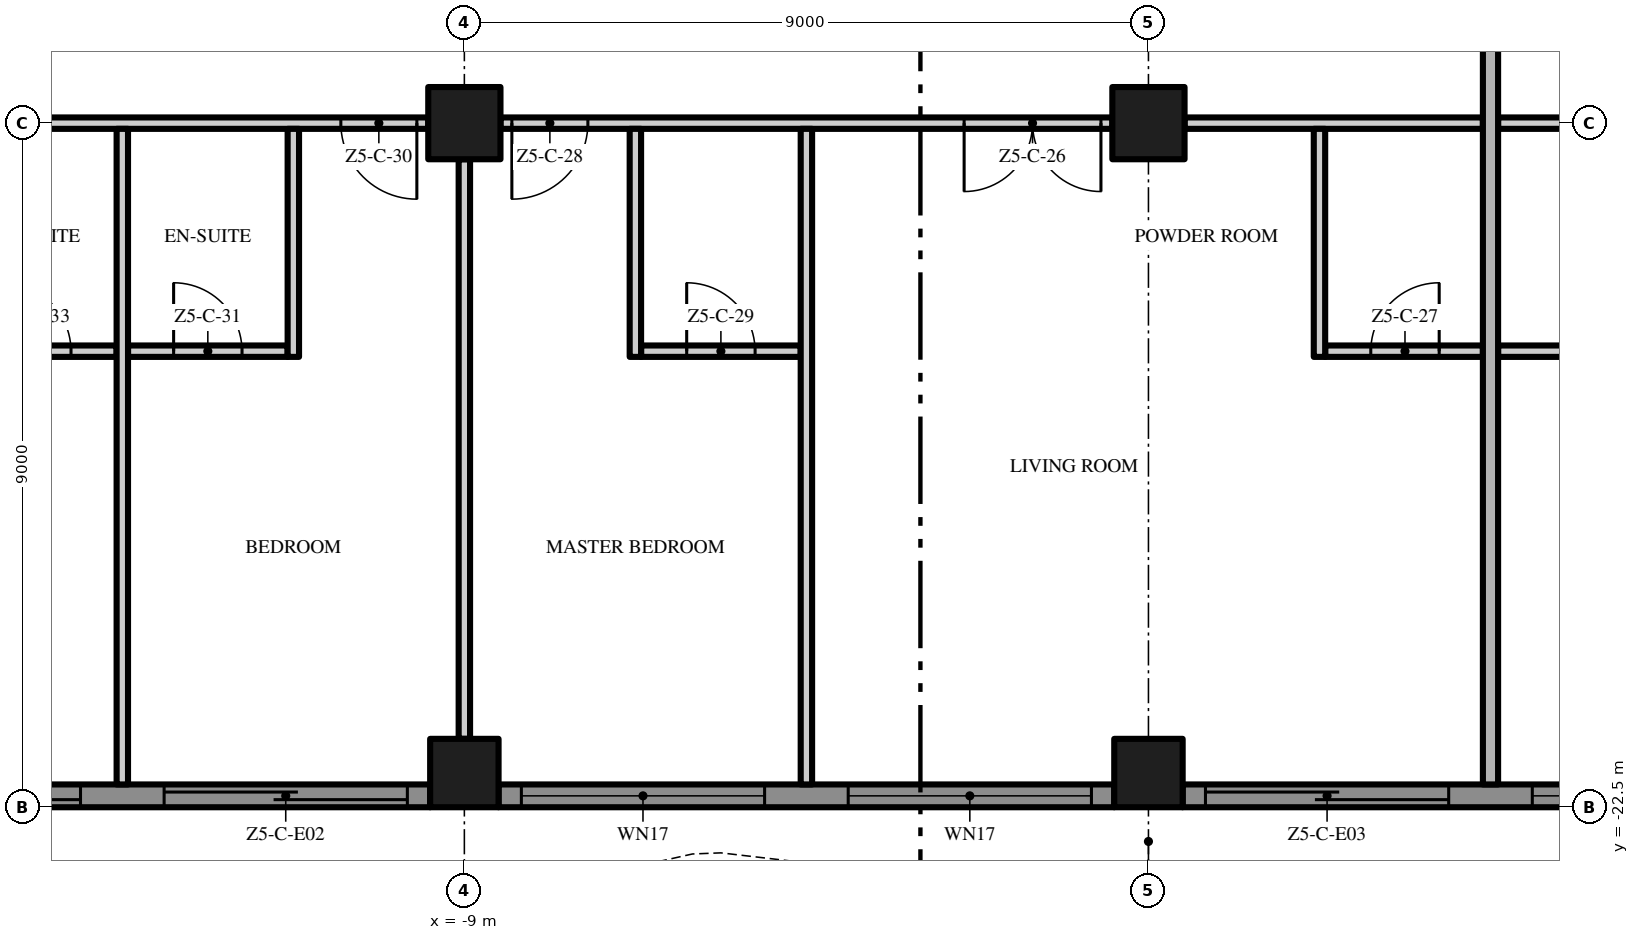
"""IFC4 building model, lengths in metres.
Left out: names, types, materials, properties, quantities, classifications, styles, units other than length and angle.
Written with IfcOpenShell. Run it as: python <this file> out.ifc"""

import sys

from ifc_helpers import new_model, si_unit, direction, frame, frame_2d, origin, origin_2d, place, context, subcontext, project, spatial, polyline, rectangle, outline, extrude, element, fill, save


model = new_model("IFC4")
c1 = context("Model", 3, precision=1e-05, world=origin(), true_north=direction((0.0, 1.0)))
c2 = subcontext(c1, "Body", "Model", "MODEL_VIEW")
j1 = project(units=[si_unit("LENGTHUNIT", "METRE"), si_unit("PLANEANGLEUNIT", "RADIAN")], contexts=[c1])
p1 = place(None, origin())
s1 = spatial("IfcSite", under=j1, at=p1, CompositionType="ELEMENT")
p2 = place(p1, origin())
s2 = spatial("IfcBuilding", under=s1, at=p2, CompositionType="ELEMENT")
p3 = place(p2, frame((0.0, 0.0, 261.6)))
s3 = spatial("IfcBuildingStorey", under=s2, at=p3, CompositionType="ELEMENT", Elevation=261.6)
p4 = place(p3, frame((-9.0, -13.5, 0.0), z_axis=(0.0, 0.0, 1.0), x_axis=(1.0, 0.0, 0.0)))
e1 = element("IfcColumn", 1, at=p4, inside=s3, PredefinedType="COLUMN", context=c2, shape_type="SweptSolid", body=[
    extrude(rectangle(XDim=0.95, YDim=0.95, at=origin_2d()), origin(), (0.0, 0.0, 1.0), 3.5),
])
p5 = place(p3, frame((-9.0, -22.05, 0.0), z_axis=(0.0, 0.0, 1.0), x_axis=(1.0, 0.0, 0.0)))
e2 = element("IfcColumn", 2, at=p5, inside=s3, PredefinedType="COLUMN", context=c2, shape_type="SweptSolid", body=[
    extrude(rectangle(XDim=0.9, YDim=0.9, at=origin_2d()), origin(), (0.0, 0.0, 1.0), 3.5),
])
p6 = place(p3, frame((0.0, -13.5, 0.0), z_axis=(0.0, 0.0, 1.0), x_axis=(1.0, 0.0, 0.0)))
e3 = element("IfcColumn", 3, at=p6, inside=s3, PredefinedType="COLUMN", context=c2, shape_type="SweptSolid", body=[
    extrude(rectangle(XDim=0.95, YDim=0.95, at=origin_2d()), origin(), (0.0, 0.0, 1.0), 3.5),
])
p7 = place(p3, frame((0.0, -22.05, 0.0), z_axis=(0.0, 0.0, 1.0), x_axis=(1.0, 0.0, 0.0)))
e4 = element("IfcColumn", 4, at=p7, inside=s3, PredefinedType="COLUMN", context=c2, shape_type="SweptSolid", body=[
    extrude(rectangle(XDim=0.9, YDim=0.9, at=origin_2d()), origin(), (0.0, 0.0, 1.0), 3.5),
])
p8 = place(p3, frame((-9.45, -22.35, 0.0), z_axis=(0.0, 0.0, 1.0), x_axis=(-1.0, 0.0, 0.0)))
e5 = element("IfcWall", 5, at=p8, inside=s3, PredefinedType="SOLIDWALL", context=c2, shape_type="SweptSolid", body=[
    extrude(rectangle(XDim=8.1, YDim=0.3, at=frame_2d((4.05, 0.0))), origin(), (0.0, 0.0, 1.0), 3.5),
])
p9 = place(p8, frame((4.6, 0.0, 0.0)))
e6 = element("IfcOpeningElement", 6, at=p9, cuts=e5, PredefinedType="OPENING", context=c2, shape_type="SweptSolid", body=[
    extrude(rectangle(XDim=3.2, YDim=2.4, at=frame_2d((1.6, 1.2))), frame((0.0, 0.16, 0.0), z_axis=(0.0, -1.0, 0.0), x_axis=(1.0, 0.0, 0.0)), (0.0, 0.0, 1.0), 0.32),
])
p10 = place(p8, frame((0.3, 0.0, 0.0)))
e7 = element("IfcOpeningElement", 7, at=p10, cuts=e5, PredefinedType="OPENING", context=c2, shape_type="SweptSolid", body=[
    extrude(rectangle(XDim=3.2, YDim=2.4, at=frame_2d((1.6, 1.2))), frame((0.0, 0.16, 0.0), z_axis=(0.0, -1.0, 0.0), x_axis=(1.0, 0.0, 0.0)), (0.0, 0.0, 1.0), 0.32),
])
p11 = place(p3, frame((-0.45, -22.35, 0.0), z_axis=(0.0, 0.0, 1.0), x_axis=(-1.0, 0.0, 0.0)))
e8 = element("IfcWall", 8, at=p11, inside=s3, PredefinedType="SOLIDWALL", context=c2, shape_type="SweptSolid", body=[
    extrude(rectangle(XDim=8.1, YDim=0.3, at=frame_2d((4.05, 0.0))), origin(), (0.0, 0.0, 1.0), 3.5),
])
p12 = place(p11, frame((4.6, 0.0, 0.45)))
e9 = element("IfcOpeningElement", 9, at=p12, cuts=e8, PredefinedType="OPENING", context=c2, shape_type="SweptSolid", body=[
    extrude(rectangle(XDim=3.2, YDim=2.65, at=frame_2d((1.6, 1.325))), frame((0.0, 0.16, 0.0), z_axis=(0.0, -1.0, 0.0), x_axis=(1.0, 0.0, 0.0)), (0.0, 0.0, 1.0), 0.32),
])
p13 = place(p11, frame((0.3, 0.0, 0.45)))
e10 = element("IfcOpeningElement", 10, at=p13, cuts=e8, PredefinedType="OPENING", context=c2, shape_type="SweptSolid", body=[
    extrude(rectangle(XDim=3.2, YDim=2.65, at=frame_2d((1.6, 1.325))), frame((0.0, 0.16, 0.0), z_axis=(0.0, -1.0, 0.0), x_axis=(1.0, 0.0, 0.0)), (0.0, 0.0, 1.0), 0.32),
])
p14 = place(p3, frame((8.55, -22.35, 0.0), z_axis=(0.0, 0.0, 1.0), x_axis=(-1.0, 0.0, 0.0)))
e11 = element("IfcWall", 11, at=p14, inside=s3, PredefinedType="SOLIDWALL", context=c2, shape_type="SweptSolid", body=[
    extrude(rectangle(XDim=8.1, YDim=0.3, at=frame_2d((4.05, 0.0))), origin(), (0.0, 0.0, 1.0), 3.5),
])
p15 = place(p14, frame((4.6, 0.0, 0.0)))
e12 = element("IfcOpeningElement", 12, at=p15, cuts=e11, PredefinedType="OPENING", context=c2, shape_type="SweptSolid", body=[
    extrude(rectangle(XDim=3.2, YDim=2.4, at=frame_2d((1.6, 1.2))), frame((0.0, 0.16, 0.0), z_axis=(0.0, -1.0, 0.0), x_axis=(1.0, 0.0, 0.0)), (0.0, 0.0, 1.0), 0.32),
])
p16 = place(p14, frame((0.3, 0.0, 0.45)))
e13 = element("IfcOpeningElement", 13, at=p16, cuts=e11, PredefinedType="OPENING", context=c2, shape_type="SweptSolid", body=[
    extrude(rectangle(XDim=3.2, YDim=2.65, at=frame_2d((1.6, 1.325))), frame((0.0, 0.16, 0.0), z_axis=(0.0, -1.0, 0.0), x_axis=(1.0, 0.0, 0.0)), (0.0, 0.0, 1.0), 0.32),
])
p17 = place(p3, origin())
e14 = element("IfcWall", 14, at=p17, inside=s3, PredefinedType="USERDEFINED", context=c2, shape_type="SweptSolid", body=[
    extrude(outline(polyline([(-22.5, -23.451), (-21.0, -23.115), (-20.625, -23.1), (-19.5, -23.231), (-18.0, -23.755), (-16.5, -24.488), (-15.0, -25.149), (-13.5, -25.485), (-13.125, -25.5), (-12.0, -25.369), (-10.5, -24.845), (-9.0, -24.112), (-7.5, -23.451), (-6.0, -23.115), (-5.625, -23.1), (-4.5, -23.231), (-3.0, -23.755), (-1.5, -24.488), (0.0, -25.149), (1.5, -25.485), (1.875, -25.5), (3.0, -25.369), (4.5, -24.845), (6.0, -24.112), (7.5, -23.451), (9.0, -23.115), (9.375, -23.1), (10.5, -23.231), (12.0, -23.755), (13.5, -24.488), (15.0, -25.149), (16.5, -25.485), (16.875, -25.5), (18.0, -25.369), (19.5, -24.845), (21.0, -24.112), (22.5, -23.451), (22.399, -23.223), (20.895, -23.885), (19.404, -24.614), (17.944, -25.124), (16.865, -25.249), (16.533, -25.236), (15.079, -24.91), (13.605, -24.261), (12.096, -23.524), (10.556, -22.986), (9.385, -22.849), (8.967, -22.866), (7.421, -23.213), (5.895, -23.885), (4.404, -24.614), (2.944, -25.124), (1.865, -25.249), (1.533, -25.236), (0.079, -24.91), (-1.395, -24.261), (-2.904, -23.524), (-4.444, -22.986), (-5.615, -22.849), (-6.033, -22.866), (-7.579, -23.213), (-9.105, -23.885), (-10.596, -24.614), (-12.056, -25.124), (-13.135, -25.249), (-13.467, -25.236), (-14.921, -24.91), (-16.395, -24.261), (-17.904, -23.524), (-19.444, -22.986), (-20.615, -22.849), (-21.033, -22.866), (-22.555, -23.208), (-22.5, -23.451)])), origin(), (0.0, 0.0, 1.0), 0.9),
])
p18 = place(p3, frame((-15.675, -16.5, 0.0), z_axis=(0.0, 0.0, 1.0), x_axis=(1.0, 0.0, 0.0)))
e15 = element("IfcWall", 15, at=p18, inside=s3, PredefinedType="PARTITIONING", context=c2, shape_type="SweptSolid", body=[
    extrude(rectangle(XDim=2.1, YDim=0.15, at=frame_2d((1.05, 0.0))), origin(), (0.0, 0.0, 1.0), 3.5),
])
p19 = place(p18, frame((0.6, 0.0, 0.0)))
e16 = element("IfcOpeningElement", 16, at=p19, cuts=e15, PredefinedType="OPENING", context=c2, shape_type="SweptSolid", body=[
    extrude(rectangle(XDim=0.9, YDim=2.1, at=frame_2d((0.45, 1.05))), frame((0.0, 0.085, 0.0), z_axis=(0.0, -1.0, 0.0), x_axis=(1.0, 0.0, 0.0)), (0.0, 0.0, 1.0), 0.17),
])
p20 = place(p3, frame((-13.425, -16.5, 0.0), z_axis=(0.0, 0.0, 1.0), x_axis=(1.0, 0.0, 0.0)))
e17 = element("IfcWall", 17, at=p20, inside=s3, PredefinedType="PARTITIONING", context=c2, shape_type="SweptSolid", body=[
    extrude(rectangle(XDim=2.1, YDim=0.15, at=frame_2d((1.05, 0.0))), origin(), (0.0, 0.0, 1.0), 3.5),
])
p21 = place(p20, frame((0.6, 0.0, 0.0)))
e18 = element("IfcOpeningElement", 18, at=p21, cuts=e17, PredefinedType="OPENING", context=c2, shape_type="SweptSolid", body=[
    extrude(rectangle(XDim=0.9, YDim=2.1, at=frame_2d((0.45, 1.05))), frame((0.0, 0.085, 0.0), z_axis=(0.0, -1.0, 0.0), x_axis=(1.0, 0.0, 0.0)), (0.0, 0.0, 1.0), 0.17),
])
p22 = place(p3, frame((-6.675, -16.5, 0.0), z_axis=(0.0, 0.0, 1.0), x_axis=(1.0, 0.0, 0.0)))
e19 = element("IfcWall", 19, at=p22, inside=s3, PredefinedType="PARTITIONING", context=c2, shape_type="SweptSolid", body=[
    extrude(rectangle(XDim=2.1, YDim=0.15, at=frame_2d((1.05, 0.0))), origin(), (0.0, 0.0, 1.0), 3.5),
])
p23 = place(p22, frame((0.6, 0.0, 0.0)))
e20 = element("IfcOpeningElement", 20, at=p23, cuts=e19, PredefinedType="OPENING", context=c2, shape_type="SweptSolid", body=[
    extrude(rectangle(XDim=0.9, YDim=2.1, at=frame_2d((0.45, 1.05))), frame((0.0, 0.085, 0.0), z_axis=(0.0, -1.0, 0.0), x_axis=(1.0, 0.0, 0.0)), (0.0, 0.0, 1.0), 0.17),
])
p24 = place(p3, frame((2.325, -16.5, 0.0), z_axis=(0.0, 0.0, 1.0), x_axis=(1.0, 0.0, 0.0)))
e21 = element("IfcWall", 21, at=p24, inside=s3, PredefinedType="PARTITIONING", context=c2, shape_type="SweptSolid", body=[
    extrude(rectangle(XDim=2.075, YDim=0.15, at=frame_2d((1.038, 0.0))), origin(), (0.0, 0.0, 1.0), 3.5),
])
p25 = place(p24, frame((0.6, 0.0, 0.0)))
e22 = element("IfcOpeningElement", 22, at=p25, cuts=e21, PredefinedType="OPENING", context=c2, shape_type="SweptSolid", body=[
    extrude(rectangle(XDim=0.9, YDim=2.1, at=frame_2d((0.45, 1.05))), frame((0.0, 0.085, 0.0), z_axis=(0.0, -1.0, 0.0), x_axis=(1.0, 0.0, 0.0)), (0.0, 0.0, 1.0), 0.17),
])
p26 = place(p3, frame((4.6, -16.5, 0.0), z_axis=(0.0, 0.0, 1.0), x_axis=(1.0, 0.0, 0.0)))
e23 = element("IfcWall", 23, at=p26, inside=s3, PredefinedType="PARTITIONING", context=c2, shape_type="SweptSolid", body=[
    extrude(rectangle(XDim=2.075, YDim=0.15, at=frame_2d((1.038, 0.0))), origin(), (0.0, 0.0, 1.0), 3.5),
])
p27 = place(p3, frame((-9.475, -13.5, 0.0), z_axis=(0.0, 0.0, 1.0), x_axis=(-1.0, 0.0, 0.0)))
e24 = element("IfcWall", 24, at=p27, inside=s3, PredefinedType="PARTITIONING", context=c2, shape_type="SweptSolid", body=[
    extrude(rectangle(XDim=8.05, YDim=0.15, at=frame_2d((4.025, 0.0))), origin(), (0.0, 0.0, 1.0), 3.5),
])
p28 = place(p27, frame((0.15, 0.0, 0.0)))
e25 = element("IfcOpeningElement", 25, at=p28, cuts=e24, PredefinedType="OPENING", context=c2, shape_type="SweptSolid", body=[
    extrude(rectangle(XDim=1.0, YDim=2.4, at=frame_2d((0.5, 1.2))), frame((0.0, 0.085, 0.0), z_axis=(0.0, -1.0, 0.0), x_axis=(1.0, 0.0, 0.0)), (0.0, 0.0, 1.0), 0.17),
])
p29 = place(p27, frame((6.9, 0.0, 0.0)))
e26 = element("IfcOpeningElement", 26, at=p29, cuts=e24, PredefinedType="OPENING", context=c2, shape_type="SweptSolid", body=[
    extrude(rectangle(XDim=1.0, YDim=2.4, at=frame_2d((0.5, 1.2))), frame((0.0, 0.085, 0.0), z_axis=(0.0, -1.0, 0.0), x_axis=(1.0, 0.0, 0.0)), (0.0, 0.0, 1.0), 0.17),
])
p30 = place(p3, frame((-0.475, -13.5, 0.0), z_axis=(0.0, 0.0, 1.0), x_axis=(-1.0, 0.0, 0.0)))
e27 = element("IfcWall", 27, at=p30, inside=s3, PredefinedType="PARTITIONING", context=c2, shape_type="SweptSolid", body=[
    extrude(rectangle(XDim=8.05, YDim=0.15, at=frame_2d((4.025, 0.0))), origin(), (0.0, 0.0, 1.0), 3.5),
])
p31 = place(p30, frame((0.15, 0.0, 0.0)))
e28 = element("IfcOpeningElement", 28, at=p31, cuts=e27, PredefinedType="OPENING", context=c2, shape_type="SweptSolid", body=[
    extrude(rectangle(XDim=1.8, YDim=2.4, at=frame_2d((0.9, 1.2))), frame((0.0, 0.085, 0.0), z_axis=(0.0, -1.0, 0.0), x_axis=(1.0, 0.0, 0.0)), (0.0, 0.0, 1.0), 0.17),
])
p32 = place(p30, frame((6.9, 0.0, 0.0)))
e29 = element("IfcOpeningElement", 29, at=p32, cuts=e27, PredefinedType="OPENING", context=c2, shape_type="SweptSolid", body=[
    extrude(rectangle(XDim=1.0, YDim=2.4, at=frame_2d((0.5, 1.2))), frame((0.0, 0.085, 0.0), z_axis=(0.0, -1.0, 0.0), x_axis=(1.0, 0.0, 0.0)), (0.0, 0.0, 1.0), 0.17),
])
for number, where, z_axis, x_axis in (
    (30, (0.475, -13.5, 0.0), (0.0, 0.0, 1.0), (1.0, 0.0, 0.0)),
    (31, (4.6, -13.5, 0.0), (0.0, 0.0, 1.0), (1.0, 0.0, 0.0)),
):
    element("IfcWall", number, at=place(p3, frame(where, z_axis=z_axis, x_axis=x_axis)), inside=s3, PredefinedType="PARTITIONING", context=c2, shape_type="SweptSolid", body=[
        extrude(rectangle(XDim=3.925, YDim=0.15, at=frame_2d((1.962, 0.0))), origin(), (0.0, 0.0, 1.0), 3.5),
    ])
p33 = place(p3, frame((-13.5, -22.2, 0.0), z_axis=(0.0, 0.0, 1.0), x_axis=(0.0, 1.0, 0.0)))
e32 = element("IfcWall", 32, at=p33, inside=s3, PredefinedType="PARTITIONING", context=c2, shape_type="SweptSolid", body=[
    extrude(rectangle(XDim=8.625, YDim=0.15, at=frame_2d((4.312, 0.0))), origin(), (0.0, 0.0, 1.0), 3.5),
])
p34 = place(p3, frame((-11.25, -16.575, 0.0), z_axis=(0.0, 0.0, 1.0), x_axis=(0.0, 1.0, 0.0)))
e33 = element("IfcWall", 33, at=p34, inside=s3, PredefinedType="PARTITIONING", context=c2, shape_type="SweptSolid", body=[
    extrude(rectangle(XDim=3.0, YDim=0.15, at=frame_2d((1.5, 0.0))), origin(), (0.0, 0.0, 1.0), 3.5),
])
p35 = place(p3, frame((-9.0, -21.6, 0.0), z_axis=(0.0, 0.0, 1.0), x_axis=(0.0, 1.0, 0.0)))
e34 = element("IfcWall", 34, at=p35, inside=s3, PredefinedType="PARTITIONING", context=c2, shape_type="SweptSolid", body=[
    extrude(rectangle(XDim=7.625, YDim=0.15, at=frame_2d((3.812, 0.0))), origin(), (0.0, 0.0, 1.0), 3.5),
])
p36 = place(p3, frame((-6.75, -16.575, 0.0), z_axis=(0.0, 0.0, 1.0), x_axis=(0.0, 1.0, 0.0)))
e35 = element("IfcWall", 35, at=p36, inside=s3, PredefinedType="PARTITIONING", context=c2, shape_type="SweptSolid", body=[
    extrude(rectangle(XDim=3.0, YDim=0.15, at=frame_2d((1.5, 0.0))), origin(), (0.0, 0.0, 1.0), 3.5),
])
p37 = place(p3, frame((-4.5, -22.2, 0.0), z_axis=(0.0, 0.0, 1.0), x_axis=(0.0, 1.0, 0.0)))
e36 = element("IfcWall", 36, at=p37, inside=s3, PredefinedType="PARTITIONING", context=c2, shape_type="SweptSolid", body=[
    extrude(rectangle(XDim=8.625, YDim=0.15, at=frame_2d((4.312, 0.0))), origin(), (0.0, 0.0, 1.0), 3.5),
])
p38 = place(p3, frame((2.25, -16.575, 0.0), z_axis=(0.0, 0.0, 1.0), x_axis=(0.0, 1.0, 0.0)))
e37 = element("IfcWall", 37, at=p38, inside=s3, PredefinedType="PARTITIONING", context=c2, shape_type="SweptSolid", body=[
    extrude(rectangle(XDim=3.0, YDim=0.15, at=frame_2d((1.5, 0.0))), origin(), (0.0, 0.0, 1.0), 3.5),
])
p39 = place(p3, frame((4.5, -22.2, 0.0), z_axis=(0.0, 0.0, 1.0), x_axis=(0.0, 1.0, 0.0)))
e38 = element("IfcWall", 38, at=p39, inside=s3, PredefinedType="PARTITIONING", context=c2, shape_type="SweptSolid", body=[
    extrude(rectangle(XDim=22.1, YDim=0.2, at=frame_2d((11.05, 0.0))), origin(), (0.0, 0.0, 1.0), 3.5),
])
p40 = place(p9, origin())
e39 = element("IfcDoor", 39, at=p40, inside=s3, OperationType="SINGLE_SWING_LEFT", PredefinedType="DOOR", context=c2, shape_type="SweptSolid", body=[
    extrude(rectangle(XDim=3.2, YDim=2.4, at=frame_2d((1.6, 1.2))), frame((0.0, 0.025, 0.0), z_axis=(0.0, -1.0, 0.0), x_axis=(1.0, 0.0, 0.0)), (0.0, 0.0, 1.0), 0.05),
])
fill(e6, e39)
p41 = place(p10, origin())
e40 = element("IfcDoor", 40, at=p41, inside=s3, OperationType="SINGLE_SWING_LEFT", PredefinedType="DOOR", context=c2, shape_type="SweptSolid", body=[
    extrude(rectangle(XDim=3.2, YDim=2.4, at=frame_2d((1.6, 1.2))), frame((0.0, 0.025, 0.0), z_axis=(0.0, -1.0, 0.0), x_axis=(1.0, 0.0, 0.0)), (0.0, 0.0, 1.0), 0.05),
])
fill(e7, e40)
p42 = place(p12, origin())
e41 = element("IfcWindow", 41, at=p42, inside=s3, PartitioningType="SINGLE_PANEL", PredefinedType="WINDOW", context=c2, shape_type="SweptSolid", body=[
    extrude(rectangle(XDim=3.2, YDim=2.65, at=frame_2d((1.6, 1.325))), frame((0.0, 0.03, 0.0), z_axis=(0.0, -1.0, 0.0), x_axis=(1.0, 0.0, 0.0)), (0.0, 0.0, 1.0), 0.06),
])
fill(e9, e41)
p43 = place(p13, origin())
e42 = element("IfcWindow", 42, at=p43, inside=s3, PartitioningType="SINGLE_PANEL", PredefinedType="WINDOW", context=c2, shape_type="SweptSolid", body=[
    extrude(rectangle(XDim=3.2, YDim=2.65, at=frame_2d((1.6, 1.325))), frame((0.0, 0.03, 0.0), z_axis=(0.0, -1.0, 0.0), x_axis=(1.0, 0.0, 0.0)), (0.0, 0.0, 1.0), 0.06),
])
fill(e10, e42)
p44 = place(p15, origin())
e43 = element("IfcDoor", 43, at=p44, inside=s3, OperationType="SINGLE_SWING_LEFT", PredefinedType="DOOR", context=c2, shape_type="SweptSolid", body=[
    extrude(rectangle(XDim=3.2, YDim=2.4, at=frame_2d((1.6, 1.2))), frame((0.0, 0.025, 0.0), z_axis=(0.0, -1.0, 0.0), x_axis=(1.0, 0.0, 0.0)), (0.0, 0.0, 1.0), 0.05),
])
fill(e12, e43)
p45 = place(p16, origin())
e44 = element("IfcWindow", 44, at=p45, inside=s3, PartitioningType="SINGLE_PANEL", PredefinedType="WINDOW", context=c2, shape_type="SweptSolid", body=[
    extrude(rectangle(XDim=3.2, YDim=2.65, at=frame_2d((1.6, 1.325))), frame((0.0, 0.03, 0.0), z_axis=(0.0, -1.0, 0.0), x_axis=(1.0, 0.0, 0.0)), (0.0, 0.0, 1.0), 0.06),
])
fill(e13, e44)
p46 = place(p31, origin())
e45 = element("IfcDoor", 45, at=p46, inside=s3, OperationType="DOUBLE_DOOR_SINGLE_SWING", PredefinedType="DOOR", context=c2, shape_type="SweptSolid", body=[
    extrude(rectangle(XDim=1.8, YDim=2.4, at=frame_2d((0.9, 1.2))), frame((0.0, 0.025, 0.0), z_axis=(0.0, -1.0, 0.0), x_axis=(1.0, 0.0, 0.0)), (0.0, 0.0, 1.0), 0.05),
])
fill(e28, e45)
p47 = place(p25, origin())
e46 = element("IfcDoor", 46, at=p47, inside=s3, OperationType="SINGLE_SWING_RIGHT", PredefinedType="DOOR", context=c2, shape_type="SweptSolid", body=[
    extrude(rectangle(XDim=0.9, YDim=2.1, at=frame_2d((0.45, 1.05))), frame((0.0, 0.025, 0.0), z_axis=(0.0, -1.0, 0.0), x_axis=(1.0, 0.0, 0.0)), (0.0, 0.0, 1.0), 0.05),
])
fill(e22, e46)
p48 = place(p32, origin())
e47 = element("IfcDoor", 47, at=p48, inside=s3, OperationType="SINGLE_SWING_RIGHT", PredefinedType="DOOR", context=c2, shape_type="SweptSolid", body=[
    extrude(rectangle(XDim=1.0, YDim=2.4, at=frame_2d((0.5, 1.2))), frame((0.0, 0.025, 0.0), z_axis=(0.0, -1.0, 0.0), x_axis=(1.0, 0.0, 0.0)), (0.0, 0.0, 1.0), 0.05),
])
fill(e29, e47)
p49 = place(p23, origin())
e48 = element("IfcDoor", 48, at=p49, inside=s3, OperationType="SINGLE_SWING_LEFT", PredefinedType="DOOR", context=c2, shape_type="SweptSolid", body=[
    extrude(rectangle(XDim=0.9, YDim=2.1, at=frame_2d((0.45, 1.05))), frame((0.0, 0.025, 0.0), z_axis=(0.0, -1.0, 0.0), x_axis=(1.0, 0.0, 0.0)), (0.0, 0.0, 1.0), 0.05),
])
fill(e20, e48)
p50 = place(p28, origin())
e49 = element("IfcDoor", 49, at=p50, inside=s3, OperationType="SINGLE_SWING_LEFT", PredefinedType="DOOR", context=c2, shape_type="SweptSolid", body=[
    extrude(rectangle(XDim=1.0, YDim=2.4, at=frame_2d((0.5, 1.2))), frame((0.0, 0.025, 0.0), z_axis=(0.0, -1.0, 0.0), x_axis=(1.0, 0.0, 0.0)), (0.0, 0.0, 1.0), 0.05),
])
fill(e25, e49)
p51 = place(p21, origin())
e50 = element("IfcDoor", 50, at=p51, inside=s3, OperationType="SINGLE_SWING_LEFT", PredefinedType="DOOR", context=c2, shape_type="SweptSolid", body=[
    extrude(rectangle(XDim=0.9, YDim=2.1, at=frame_2d((0.45, 1.05))), frame((0.0, 0.025, 0.0), z_axis=(0.0, -1.0, 0.0), x_axis=(1.0, 0.0, 0.0)), (0.0, 0.0, 1.0), 0.05),
])
fill(e18, e50)
p52 = place(p19, origin())
e51 = element("IfcDoor", 51, at=p52, inside=s3, OperationType="SINGLE_SWING_LEFT", PredefinedType="DOOR", context=c2, shape_type="SweptSolid", body=[
    extrude(rectangle(XDim=0.9, YDim=2.1, at=frame_2d((0.45, 1.05))), frame((0.0, 0.025, 0.0), z_axis=(0.0, -1.0, 0.0), x_axis=(1.0, 0.0, 0.0)), (0.0, 0.0, 1.0), 0.05),
])
fill(e16, e51)
save(model, sys.argv[1])
